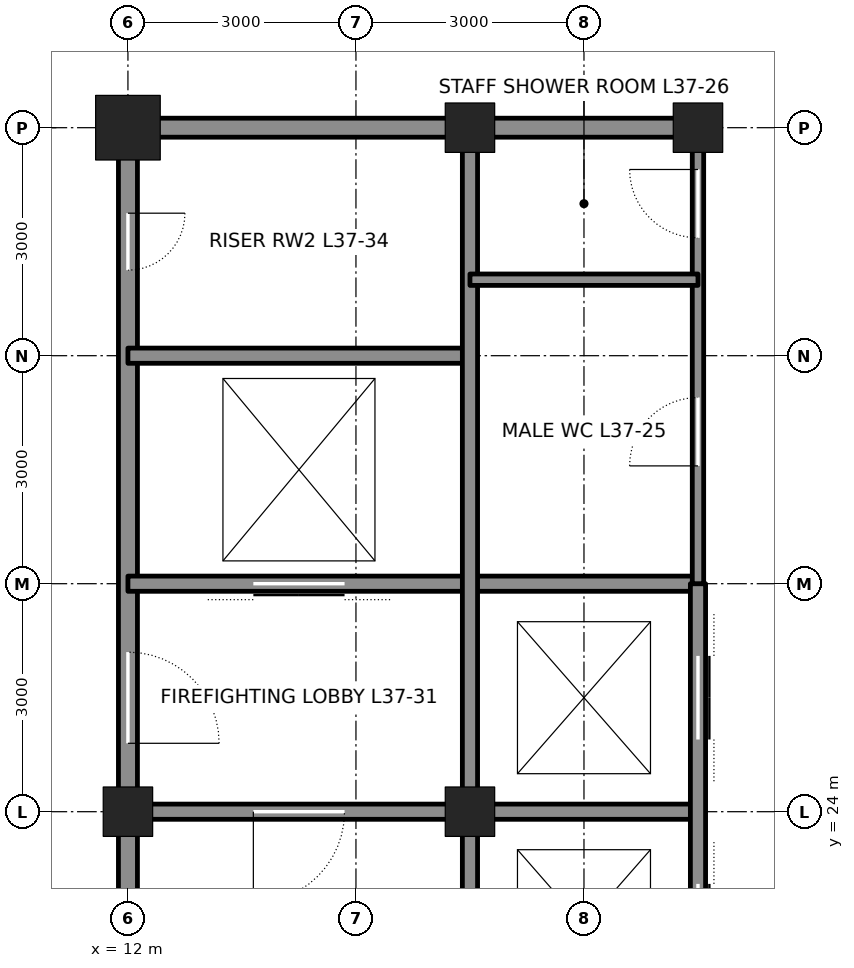
"""IFC4 building model, lengths in metres.
Left out: names, types, materials, properties, quantities, classifications, styles, units other than length and angle.
Written with IfcOpenShell. Run it as: python <this file> out.ifc"""

import sys

from ifc_helpers import new_model, si_unit, direction, frame, frame_2d, origin, origin_2d, place, context, subcontext, project, spatial, rectangle, hollow_rectangle, extrude, element, fill, save


model = new_model("IFC4")
c1 = context("Model", 3, precision=1e-05, world=origin(), true_north=direction((0.0, 1.0)))
c2 = subcontext(c1, "Body", "Model", "MODEL_VIEW")
j1 = project(units=[si_unit("LENGTHUNIT", "METRE"), si_unit("PLANEANGLEUNIT", "RADIAN")], contexts=[c1])
p1 = place(None, origin())
s1 = spatial("IfcSite", under=j1, at=p1, CompositionType="ELEMENT")
p2 = place(p1, origin())
s2 = spatial("IfcBuilding", under=s1, at=p2, CompositionType="ELEMENT")
p3 = place(p2, frame((0.0, 0.0, 169.8)))
s3 = spatial("IfcBuildingStorey", under=s2, at=p3, CompositionType="ELEMENT", Elevation=169.8)
p4 = place(p3, frame((12.0, 33.0, 0.0), z_axis=(0.0, 0.0, 1.0), x_axis=(1.0, 0.0, 0.0)))
e1 = element("IfcColumn", 1, at=p4, inside=s3, PredefinedType="COLUMN", context=c2, shape_type="SweptSolid", body=[
    extrude(hollow_rectangle(XDim=0.85, YDim=0.85, WallThickness=0.085, at=origin_2d()), origin(), (0.0, 0.0, 1.0), 4.2),
])
for number, where, z_axis, x_axis in (
    (2, (16.5, 33.0, 0.0), (0.0, 0.0, 1.0), (1.0, 0.0, 0.0)),
    (3, (19.5, 33.0, 0.0), (0.0, 0.0, 1.0), (1.0, 0.0, 0.0)),
    (4, (12.0, 24.0, 0.0), (0.0, 0.0, 1.0), (1.0, 0.0, 0.0)),
    (5, (16.5, 24.0, 0.0), (0.0, 0.0, 1.0), (1.0, 0.0, 0.0)),
):
    element("IfcColumn", number, at=place(p3, frame(where, z_axis=z_axis, x_axis=x_axis)), inside=s3, PredefinedType="COLUMN", context=c2, shape_type="SweptSolid", body=[
        extrude(hollow_rectangle(XDim=0.65, YDim=0.65, WallThickness=0.065, at=origin_2d()), origin(), (0.0, 0.0, 1.0), 4.2),
    ])
p5 = place(p3, frame((12.0, 21.25, 0.0), z_axis=(0.0, 0.0, 1.0), x_axis=(0.0, 1.0, 0.0)))
e6 = element("IfcWall", 6, at=p5, inside=s3, PredefinedType="SOLIDWALL", context=c2, shape_type="SweptSolid", body=[
    extrude(rectangle(XDim=2.5, YDim=0.25, at=frame_2d((1.25, 0.0))), origin(), (0.0, 0.0, 1.0), 3.113),
])
p6 = place(p3, frame((12.0, 24.25, 0.0), z_axis=(0.0, 0.0, 1.0), x_axis=(0.0, 1.0, 0.0)))
e7 = element("IfcWall", 7, at=p6, inside=s3, PredefinedType="SOLIDWALL", context=c2, shape_type="SweptSolid", body=[
    extrude(rectangle(XDim=8.5, YDim=0.25, at=frame_2d((4.25, 0.0))), origin(), (0.0, 0.0, 1.0), 3.113),
])
p7 = place(p6, frame((0.65, 0.0, 0.0)))
e8 = element("IfcOpeningElement", 8, at=p7, cuts=e7, PredefinedType="OPENING", context=c2, shape_type="SweptSolid", body=[
    extrude(rectangle(XDim=1.2, YDim=2.1, at=frame_2d((0.6, 1.05))), frame((0.0, 0.135, 0.0), z_axis=(0.0, -1.0, 0.0), x_axis=(1.0, 0.0, 0.0)), (0.0, 0.0, 1.0), 0.27),
])
p8 = place(p6, frame((6.875, 0.0, 0.0)))
e9 = element("IfcOpeningElement", 9, at=p8, cuts=e7, PredefinedType="OPENING", context=c2, shape_type="SweptSolid", body=[
    extrude(rectangle(XDim=0.75, YDim=2.1, at=frame_2d((0.375, 1.05))), frame((0.0, 0.135, 0.0), z_axis=(0.0, -1.0, 0.0), x_axis=(1.0, 0.0, 0.0)), (0.0, 0.0, 1.0), 0.27),
])
p9 = place(p3, frame((12.25, 24.0, 0.0), z_axis=(0.0, 0.0, 1.0), x_axis=(1.0, 0.0, 0.0)))
e10 = element("IfcWall", 10, at=p9, inside=s3, PredefinedType="SOLIDWALL", context=c2, shape_type="SweptSolid", body=[
    extrude(rectangle(XDim=4.0, YDim=0.2, at=frame_2d((2.0, 0.0))), origin(), (0.0, 0.0, 1.0), 3.09),
])
p10 = place(p9, frame((1.4, 0.0, 0.0)))
e11 = element("IfcOpeningElement", 11, at=p10, cuts=e10, PredefinedType="OPENING", context=c2, shape_type="SweptSolid", body=[
    extrude(rectangle(XDim=1.2, YDim=2.1, at=frame_2d((0.6, 1.05))), frame((0.0, 0.11, 0.0), z_axis=(0.0, -1.0, 0.0), x_axis=(1.0, 0.0, 0.0)), (0.0, 0.0, 1.0), 0.22),
])
p11 = place(p3, frame((16.75, 24.0, 0.0), z_axis=(0.0, 0.0, 1.0), x_axis=(1.0, 0.0, 0.0)))
e12 = element("IfcWall", 12, at=p11, inside=s3, PredefinedType="SOLIDWALL", context=c2, shape_type="SweptSolid", body=[
    extrude(rectangle(XDim=2.75, YDim=0.2, at=frame_2d((1.375, 0.0))), origin(), (0.0, 0.0, 1.0), 3.09),
])
p12 = place(p3, frame((12.0, 27.0, 0.0), z_axis=(0.0, 0.0, 1.0), x_axis=(1.0, 0.0, 0.0)))
e13 = element("IfcWall", 13, at=p12, inside=s3, PredefinedType="SOLIDWALL", context=c2, shape_type="SweptSolid", body=[
    extrude(rectangle(XDim=7.5, YDim=0.2, at=frame_2d((3.75, 0.0))), origin(), (0.0, 0.0, 1.0), 4.04),
])
p13 = place(p12, frame((1.65, 0.0, 0.0)))
e14 = element("IfcOpeningElement", 14, at=p13, cuts=e13, PredefinedType="OPENING", context=c2, shape_type="SweptSolid", body=[
    extrude(rectangle(XDim=1.2, YDim=2.1, at=frame_2d((0.6, 1.05))), frame((0.0, 0.11, 0.0), z_axis=(0.0, -1.0, 0.0), x_axis=(1.0, 0.0, 0.0)), (0.0, 0.0, 1.0), 0.22),
])
p14 = place(p3, frame((12.0, 30.0, 0.0), z_axis=(0.0, 0.0, 1.0), x_axis=(1.0, 0.0, 0.0)))
e15 = element("IfcWall", 15, at=p14, inside=s3, PredefinedType="SOLIDWALL", context=c2, shape_type="SweptSolid", body=[
    extrude(rectangle(XDim=4.5, YDim=0.2, at=frame_2d((2.25, 0.0))), origin(), (0.0, 0.0, 1.0), 4.04),
])
p15 = place(p3, frame((12.25, 33.0, 0.0), z_axis=(0.0, 0.0, 1.0), x_axis=(1.0, 0.0, 0.0)))
e16 = element("IfcWall", 16, at=p15, inside=s3, PredefinedType="SOLIDWALL", context=c2, shape_type="SweptSolid", body=[
    extrude(rectangle(XDim=4.0, YDim=0.25, at=frame_2d((2.0, 0.0))), origin(), (0.0, 0.0, 1.0), 3.181),
])
p16 = place(p3, frame((16.75, 33.0, 0.0), z_axis=(0.0, 0.0, 1.0), x_axis=(1.0, 0.0, 0.0)))
e17 = element("IfcWall", 17, at=p16, inside=s3, PredefinedType="SOLIDWALL", context=c2, shape_type="SweptSolid", body=[
    extrude(rectangle(XDim=2.5, YDim=0.25, at=frame_2d((1.25, 0.0))), origin(), (0.0, 0.0, 1.0), 3.181),
])
p17 = place(p3, frame((16.5, 21.25, 0.0), z_axis=(0.0, 0.0, 1.0), x_axis=(0.0, 1.0, 0.0)))
e18 = element("IfcWall", 18, at=p17, inside=s3, PredefinedType="SOLIDWALL", context=c2, shape_type="SweptSolid", body=[
    extrude(rectangle(XDim=2.5, YDim=0.2, at=frame_2d((1.25, 0.0))), origin(), (0.0, 0.0, 1.0), 3.113),
])
p18 = place(p3, frame((16.5, 24.25, 0.0), z_axis=(0.0, 0.0, 1.0), x_axis=(0.0, 1.0, 0.0)))
e19 = element("IfcWall", 19, at=p18, inside=s3, PredefinedType="SOLIDWALL", context=c2, shape_type="SweptSolid", body=[
    extrude(rectangle(XDim=8.5, YDim=0.2, at=frame_2d((4.25, 0.0))), origin(), (0.0, 0.0, 1.0), 3.113),
])
p19 = place(p3, frame((19.5, 15.0, 0.0), z_axis=(0.0, 0.0, 1.0), x_axis=(0.0, 1.0, 0.0)))
e20 = element("IfcWall", 20, at=p19, inside=s3, PredefinedType="SOLIDWALL", context=c2, shape_type="SweptSolid", body=[
    extrude(rectangle(XDim=12.0, YDim=0.2, at=frame_2d((6.0, 0.0))), origin(), (0.0, 0.0, 1.0), 3.064),
])
p20 = place(p19, frame((0.95, 0.0, 0.0)))
e21 = element("IfcOpeningElement", 21, at=p20, cuts=e20, PredefinedType="OPENING", context=c2, shape_type="SweptSolid", body=[
    extrude(rectangle(XDim=1.1, YDim=2.1, at=frame_2d((0.55, 1.05))), frame((0.0, 0.11, 0.0), z_axis=(0.0, -1.0, 0.0), x_axis=(1.0, 0.0, 0.0)), (0.0, 0.0, 1.0), 0.22),
])
p21 = place(p19, frame((3.95, 0.0, 0.0)))
e22 = element("IfcOpeningElement", 22, at=p21, cuts=e20, PredefinedType="OPENING", context=c2, shape_type="SweptSolid", body=[
    extrude(rectangle(XDim=1.1, YDim=2.1, at=frame_2d((0.55, 1.05))), frame((0.0, 0.11, 0.0), z_axis=(0.0, -1.0, 0.0), x_axis=(1.0, 0.0, 0.0)), (0.0, 0.0, 1.0), 0.22),
])
p22 = place(p19, frame((6.95, 0.0, 0.0)))
e23 = element("IfcOpeningElement", 23, at=p22, cuts=e20, PredefinedType="OPENING", context=c2, shape_type="SweptSolid", body=[
    extrude(rectangle(XDim=1.1, YDim=2.1, at=frame_2d((0.55, 1.05))), frame((0.0, 0.11, 0.0), z_axis=(0.0, -1.0, 0.0), x_axis=(1.0, 0.0, 0.0)), (0.0, 0.0, 1.0), 0.22),
])
p23 = place(p19, frame((9.95, 0.0, 0.0)))
e24 = element("IfcOpeningElement", 24, at=p23, cuts=e20, PredefinedType="OPENING", context=c2, shape_type="SweptSolid", body=[
    extrude(rectangle(XDim=1.1, YDim=2.1, at=frame_2d((0.55, 1.05))), frame((0.0, 0.11, 0.0), z_axis=(0.0, -1.0, 0.0), x_axis=(1.0, 0.0, 0.0)), (0.0, 0.0, 1.0), 0.22),
])
p24 = place(p3, frame((19.5, 27.0, 0.0), z_axis=(0.0, 0.0, 1.0), x_axis=(0.0, 1.0, 0.0)))
e25 = element("IfcWall", 25, at=p24, inside=s3, PredefinedType="PARTITIONING", context=c2, shape_type="SweptSolid", body=[
    extrude(rectangle(XDim=5.75, YDim=0.15, at=frame_2d((2.875, 0.0))), origin(), (0.0, 0.0, 1.0), 3.064),
])
p25 = place(p24, frame((1.55, 0.0, 0.0)))
e26 = element("IfcOpeningElement", 26, at=p25, cuts=e25, PredefinedType="OPENING", context=c2, shape_type="SweptSolid", body=[
    extrude(rectangle(XDim=0.9, YDim=2.1, at=frame_2d((0.45, 1.05))), frame((0.0, 0.085, 0.0), z_axis=(0.0, -1.0, 0.0), x_axis=(1.0, 0.0, 0.0)), (0.0, 0.0, 1.0), 0.17),
])
p26 = place(p24, frame((4.55, 0.0, 0.0)))
e27 = element("IfcOpeningElement", 27, at=p26, cuts=e25, PredefinedType="OPENING", context=c2, shape_type="SweptSolid", body=[
    extrude(rectangle(XDim=0.9, YDim=2.1, at=frame_2d((0.45, 1.05))), frame((0.0, 0.085, 0.0), z_axis=(0.0, -1.0, 0.0), x_axis=(1.0, 0.0, 0.0)), (0.0, 0.0, 1.0), 0.17),
])
p27 = place(p3, frame((16.5, 31.0, 0.0), z_axis=(0.0, 0.0, 1.0), x_axis=(1.0, 0.0, 0.0)))
e28 = element("IfcWall", 28, at=p27, inside=s3, PredefinedType="PARTITIONING", context=c2, shape_type="SweptSolid", body=[
    extrude(rectangle(XDim=3.0, YDim=0.15, at=frame_2d((1.5, 0.0))), origin(), (0.0, 0.0, 1.0), 4.04),
])
p28 = place(p10, frame((1.2, 0.0, 0.0), z_axis=(0.0, 0.0, 1.0), x_axis=(-1.0, 0.0, 0.0)))
e29 = element("IfcDoor", 29, at=p28, inside=s3, OperationType="SINGLE_SWING_RIGHT", PredefinedType="DOOR", context=c2, shape_type="SweptSolid", body=[
    extrude(rectangle(XDim=1.2, YDim=2.1, at=frame_2d((0.6, 1.05))), frame((0.0, 0.025, 0.0), z_axis=(0.0, -1.0, 0.0), x_axis=(1.0, 0.0, 0.0)), (0.0, 0.0, 1.0), 0.05),
])
fill(e11, e29)
p29 = place(p7, frame((1.2, 0.0, 0.0), z_axis=(0.0, 0.0, 1.0), x_axis=(-1.0, 0.0, 0.0)))
e30 = element("IfcDoor", 30, at=p29, inside=s3, OperationType="SINGLE_SWING_RIGHT", PredefinedType="DOOR", context=c2, shape_type="SweptSolid", body=[
    extrude(rectangle(XDim=1.2, YDim=2.1, at=frame_2d((0.6, 1.05))), frame((0.0, 0.025, 0.0), z_axis=(0.0, -1.0, 0.0), x_axis=(1.0, 0.0, 0.0)), (0.0, 0.0, 1.0), 0.05),
])
fill(e8, e30)
p30 = place(p13, origin())
e31 = element("IfcDoor", 31, at=p30, inside=s3, OperationType="DOUBLE_DOOR_SLIDING", PredefinedType="DOOR", context=c2, shape_type="SweptSolid", body=[
    extrude(rectangle(XDim=1.2, YDim=2.1, at=frame_2d((0.6, 1.05))), frame((0.0, 0.025, 0.0), z_axis=(0.0, -1.0, 0.0), x_axis=(1.0, 0.0, 0.0)), (0.0, 0.0, 1.0), 0.05),
])
fill(e14, e31)
p31 = place(p8, frame((0.75, 0.0, 0.0), z_axis=(0.0, 0.0, 1.0), x_axis=(-1.0, 0.0, 0.0)))
e32 = element("IfcDoor", 32, at=p31, inside=s3, OperationType="SINGLE_SWING_LEFT", PredefinedType="DOOR", context=c2, shape_type="SweptSolid", body=[
    extrude(rectangle(XDim=0.75, YDim=2.1, at=frame_2d((0.375, 1.05))), frame((0.0, 0.025, 0.0), z_axis=(0.0, -1.0, 0.0), x_axis=(1.0, 0.0, 0.0)), (0.0, 0.0, 1.0), 0.05),
])
fill(e9, e32)
p32 = place(p25, origin())
e33 = element("IfcDoor", 33, at=p32, inside=s3, OperationType="SINGLE_SWING_LEFT", PredefinedType="DOOR", context=c2, shape_type="SweptSolid", body=[
    extrude(rectangle(XDim=0.9, YDim=2.1, at=frame_2d((0.45, 1.05))), frame((0.0, 0.025, 0.0), z_axis=(0.0, -1.0, 0.0), x_axis=(1.0, 0.0, 0.0)), (0.0, 0.0, 1.0), 0.05),
])
fill(e26, e33)
p33 = place(p26, origin())
e34 = element("IfcDoor", 34, at=p33, inside=s3, OperationType="SINGLE_SWING_RIGHT", PredefinedType="DOOR", context=c2, shape_type="SweptSolid", body=[
    extrude(rectangle(XDim=0.9, YDim=2.1, at=frame_2d((0.45, 1.05))), frame((0.0, 0.025, 0.0), z_axis=(0.0, -1.0, 0.0), x_axis=(1.0, 0.0, 0.0)), (0.0, 0.0, 1.0), 0.05),
])
fill(e27, e34)
p34 = place(p22, origin())
e35 = element("IfcDoor", 35, at=p34, inside=s3, OperationType="DOUBLE_DOOR_SLIDING", PredefinedType="DOOR", context=c2, shape_type="SweptSolid", body=[
    extrude(rectangle(XDim=1.1, YDim=2.1, at=frame_2d((0.55, 1.05))), frame((0.0, 0.025, 0.0), z_axis=(0.0, -1.0, 0.0), x_axis=(1.0, 0.0, 0.0)), (0.0, 0.0, 1.0), 0.05),
])
fill(e23, e35)
p35 = place(p23, origin())
e36 = element("IfcDoor", 36, at=p35, inside=s3, OperationType="DOUBLE_DOOR_SLIDING", PredefinedType="DOOR", context=c2, shape_type="SweptSolid", body=[
    extrude(rectangle(XDim=1.1, YDim=2.1, at=frame_2d((0.55, 1.05))), frame((0.0, 0.025, 0.0), z_axis=(0.0, -1.0, 0.0), x_axis=(1.0, 0.0, 0.0)), (0.0, 0.0, 1.0), 0.05),
])
fill(e24, e36)
save(model, sys.argv[1])
